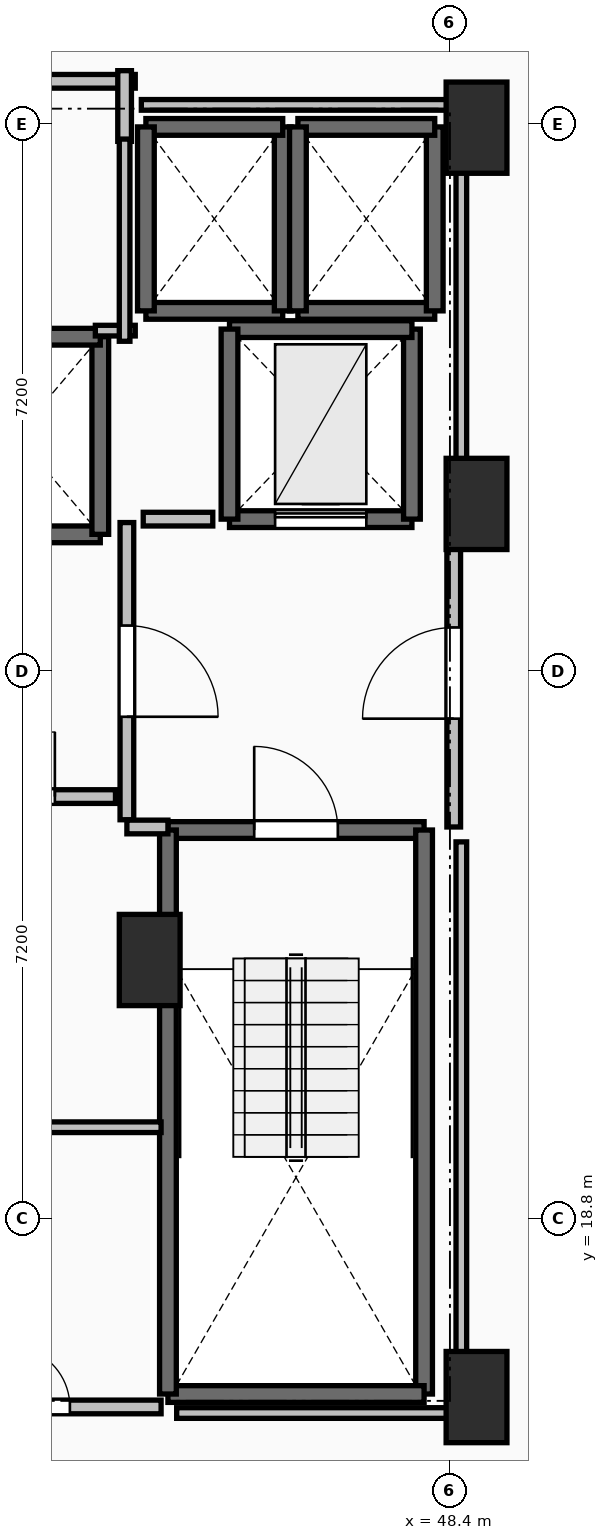
"""IFC4 building model, lengths in metres.
Left out: names, types, materials, properties, quantities, classifications, styles, units other than length and angle.
Written with IfcOpenShell. Run it as: python <this file> out.ifc"""

import sys

from ifc_helpers import new_model, si_unit, direction, frame, frame_2d, origin, origin_2d, place, context, subcontext, project, spatial, rectangle, extrude, element, fill, save


model = new_model("IFC4")
c1 = context("Model", 3, precision=1e-05, world=origin(), true_north=direction((0.0, 1.0)))
c2 = subcontext(c1, "Body", "Model", "MODEL_VIEW")
j1 = project(units=[si_unit("LENGTHUNIT", "METRE"), si_unit("PLANEANGLEUNIT", "RADIAN")], contexts=[c1])
p1 = place(None, origin())
s1 = spatial("IfcSite", under=j1, at=p1, CompositionType="ELEMENT")
p2 = place(p1, origin())
s2 = spatial("IfcBuilding", under=s1, at=p2, CompositionType="ELEMENT")
p3 = place(p2, frame((0.0, 0.0, 34.5)))
s3 = spatial("IfcBuildingStorey", under=s2, at=p3, CompositionType="ELEMENT", Elevation=34.5)
for number, where, z_axis, x_axis in (
    (1, (48.75, 33.15, 0.0), (0.0, 0.0, 1.0), (1.0, 0.0, 0.0)),
    (2, (48.75, 28.2, 0.0), (0.0, 0.0, 1.0), (1.0, 0.0, 0.0)),
    (3, (48.75, 16.45, 0.0), (0.0, 0.0, 1.0), (1.0, 0.0, 0.0)),
    (4, (44.45, 22.2, 0.0), (0.0, 0.0, 1.0), (1.0, 0.0, 0.0)),
):
    element("IfcColumn", number, at=place(p3, frame(where, z_axis=z_axis, x_axis=x_axis)), inside=s3, PredefinedType="PILASTER", context=c2, shape_type="SweptSolid", body=[
        extrude(rectangle(XDim=0.8, YDim=1.2, at=origin_2d()), origin(), (0.0, 0.0, 1.0), 3.5),
    ])
p4 = place(p3, frame((44.69, 23.91, 0.0), z_axis=(0.0, 0.0, 1.0), x_axis=(1.0, 0.0, 0.0)))
e5 = element("IfcWall", 5, at=p4, inside=s3, PredefinedType="SOLIDWALL", context=c2, shape_type="SweptSolid", body=[
    extrude(rectangle(XDim=3.37, YDim=0.22, at=frame_2d((1.685, 0.0))), origin(), (0.0, 0.0, 1.0), 3.24),
])
p5 = place(p4, frame((1.135, 0.0, 0.0)))
e6 = element("IfcOpeningElement", 6, at=p5, cuts=e5, PredefinedType="OPENING", context=c2, shape_type="SweptSolid", body=[
    extrude(rectangle(XDim=1.1, YDim=2.15, at=frame_2d((0.55, 1.075))), frame((0.0, 0.125, 0.0), z_axis=(0.0, -1.0, 0.0), x_axis=(1.0, 0.0, 0.0)), (0.0, 0.0, 1.0), 0.25),
])
p6 = place(p3, frame((48.06, 23.91, 0.0), z_axis=(0.0, 0.0, 1.0), x_axis=(0.0, -1.0, 0.0)))
e7 = element("IfcWall", 7, at=p6, inside=s3, PredefinedType="SOLIDWALL", context=c2, shape_type="SweptSolid", body=[
    extrude(rectangle(XDim=7.42, YDim=0.22, at=frame_2d((3.71, 0.0))), origin(), (0.0, 0.0, 1.0), 3.24),
])
p7 = place(p3, frame((48.06, 16.49, 0.0), z_axis=(0.0, 0.0, 1.0), x_axis=(-1.0, 0.0, 0.0)))
e8 = element("IfcWall", 8, at=p7, inside=s3, PredefinedType="SOLIDWALL", context=c2, shape_type="SweptSolid", body=[
    extrude(rectangle(XDim=3.37, YDim=0.22, at=frame_2d((1.685, 0.0))), origin(), (0.0, 0.0, 1.0), 3.24),
])
p8 = place(p3, frame((44.69, 16.49, 0.0), z_axis=(0.0, 0.0, 1.0), x_axis=(0.0, 1.0, 0.0)))
e9 = element("IfcWall", 9, at=p8, inside=s3, PredefinedType="SOLIDWALL", context=c2, shape_type="SweptSolid", body=[
    extrude(rectangle(XDim=7.42, YDim=0.22, at=frame_2d((3.71, 0.0))), origin(), (0.0, 0.0, 1.0), 3.24),
])
p9 = place(p3, frame((41.6, 27.8, 0.0), z_axis=(0.0, 0.0, 1.0), x_axis=(1.0, 0.0, 0.0)))
e10 = element("IfcWall", 10, at=p9, inside=s3, PredefinedType="SOLIDWALL", context=c2, shape_type="SweptSolid", body=[
    extrude(rectangle(XDim=2.2, YDim=0.22, at=frame_2d((1.1, 0.0))), origin(), (0.0, 0.0, 1.0), 3.24),
])
p10 = place(p3, frame((43.8, 27.8, 0.0), z_axis=(0.0, 0.0, 1.0), x_axis=(0.0, 1.0, 0.0)))
e11 = element("IfcWall", 11, at=p10, inside=s3, PredefinedType="SOLIDWALL", context=c2, shape_type="SweptSolid", body=[
    extrude(rectangle(XDim=2.6, YDim=0.22, at=frame_2d((1.3, 0.0))), origin(), (0.0, 0.0, 1.0), 3.24),
])
p11 = place(p3, frame((43.8, 30.4, 0.0), z_axis=(0.0, 0.0, 1.0), x_axis=(-1.0, 0.0, 0.0)))
e12 = element("IfcWall", 12, at=p11, inside=s3, PredefinedType="SOLIDWALL", context=c2, shape_type="SweptSolid", body=[
    extrude(rectangle(XDim=2.2, YDim=0.22, at=frame_2d((1.1, 0.0))), origin(), (0.0, 0.0, 1.0), 3.24),
])
p12 = place(p3, frame((44.4, 30.74, 0.0), z_axis=(0.0, 0.0, 1.0), x_axis=(1.0, 0.0, 0.0)))
e13 = element("IfcWall", 13, at=p12, inside=s3, PredefinedType="SOLIDWALL", context=c2, shape_type="SweptSolid", body=[
    extrude(rectangle(XDim=1.8, YDim=0.22, at=frame_2d((0.9, 0.0))), origin(), (0.0, 0.0, 1.0), 3.24),
])
p13 = place(p3, frame((46.2, 30.74, 0.0), z_axis=(0.0, 0.0, 1.0), x_axis=(0.0, 1.0, 0.0)))
e14 = element("IfcWall", 14, at=p13, inside=s3, PredefinedType="SOLIDWALL", context=c2, shape_type="SweptSolid", body=[
    extrude(rectangle(XDim=2.42, YDim=0.22, at=frame_2d((1.21, 0.0))), origin(), (0.0, 0.0, 1.0), 3.24),
])
p14 = place(p3, frame((46.2, 33.16, 0.0), z_axis=(0.0, 0.0, 1.0), x_axis=(-1.0, 0.0, 0.0)))
e15 = element("IfcWall", 15, at=p14, inside=s3, PredefinedType="SOLIDWALL", context=c2, shape_type="SweptSolid", body=[
    extrude(rectangle(XDim=1.8, YDim=0.22, at=frame_2d((0.9, 0.0))), origin(), (0.0, 0.0, 1.0), 3.24),
])
p15 = place(p3, frame((44.4, 33.16, 0.0), z_axis=(0.0, 0.0, 1.0), x_axis=(0.0, -1.0, 0.0)))
e16 = element("IfcWall", 16, at=p15, inside=s3, PredefinedType="SOLIDWALL", context=c2, shape_type="SweptSolid", body=[
    extrude(rectangle(XDim=2.42, YDim=0.22, at=frame_2d((1.21, 0.0))), origin(), (0.0, 0.0, 1.0), 3.24),
])
p16 = place(p3, frame((46.4, 30.74, 0.0), z_axis=(0.0, 0.0, 1.0), x_axis=(1.0, 0.0, 0.0)))
e17 = element("IfcWall", 17, at=p16, inside=s3, PredefinedType="SOLIDWALL", context=c2, shape_type="SweptSolid", body=[
    extrude(rectangle(XDim=1.8, YDim=0.22, at=frame_2d((0.9, 0.0))), origin(), (0.0, 0.0, 1.0), 3.24),
])
p17 = place(p3, frame((48.2, 30.74, 0.0), z_axis=(0.0, 0.0, 1.0), x_axis=(0.0, 1.0, 0.0)))
e18 = element("IfcWall", 18, at=p17, inside=s3, PredefinedType="SOLIDWALL", context=c2, shape_type="SweptSolid", body=[
    extrude(rectangle(XDim=2.42, YDim=0.22, at=frame_2d((1.21, 0.0))), origin(), (0.0, 0.0, 1.0), 3.24),
])
p18 = place(p3, frame((48.2, 33.16, 0.0), z_axis=(0.0, 0.0, 1.0), x_axis=(-1.0, 0.0, 0.0)))
e19 = element("IfcWall", 19, at=p18, inside=s3, PredefinedType="SOLIDWALL", context=c2, shape_type="SweptSolid", body=[
    extrude(rectangle(XDim=1.8, YDim=0.22, at=frame_2d((0.9, 0.0))), origin(), (0.0, 0.0, 1.0), 3.24),
])
p19 = place(p3, frame((46.4, 33.16, 0.0), z_axis=(0.0, 0.0, 1.0), x_axis=(0.0, -1.0, 0.0)))
e20 = element("IfcWall", 20, at=p19, inside=s3, PredefinedType="SOLIDWALL", context=c2, shape_type="SweptSolid", body=[
    extrude(rectangle(XDim=2.42, YDim=0.22, at=frame_2d((1.21, 0.0))), origin(), (0.0, 0.0, 1.0), 3.24),
])
p20 = place(p3, frame((45.5, 28.0, 0.0), z_axis=(0.0, 0.0, 1.0), x_axis=(1.0, 0.0, 0.0)))
e21 = element("IfcWall", 21, at=p20, inside=s3, PredefinedType="SHEAR", context=c2, shape_type="SweptSolid", body=[
    extrude(rectangle(XDim=2.4, YDim=0.22, at=frame_2d((1.2, 0.0))), origin(), (0.0, 0.0, 1.0), 3.24),
])
p21 = place(p20, frame((0.6, 0.0, 0.0)))
e22 = element("IfcOpeningElement", 22, at=p21, cuts=e21, PredefinedType="OPENING", context=c2, shape_type="SweptSolid", body=[
    extrude(rectangle(XDim=1.2, YDim=2.2, at=frame_2d((0.6, 1.1))), frame((0.0, 0.125, 0.0), z_axis=(0.0, -1.0, 0.0), x_axis=(1.0, 0.0, 0.0)), (0.0, 0.0, 1.0), 0.25),
])
p22 = place(p3, frame((47.9, 28.0, 0.0), z_axis=(0.0, 0.0, 1.0), x_axis=(0.0, 1.0, 0.0)))
e23 = element("IfcWall", 23, at=p22, inside=s3, PredefinedType="SHEAR", context=c2, shape_type="SweptSolid", body=[
    extrude(rectangle(XDim=2.5, YDim=0.22, at=frame_2d((1.25, 0.0))), origin(), (0.0, 0.0, 1.0), 3.24),
])
p23 = place(p3, frame((47.9, 30.5, 0.0), z_axis=(0.0, 0.0, 1.0), x_axis=(-1.0, 0.0, 0.0)))
e24 = element("IfcWall", 24, at=p23, inside=s3, PredefinedType="SHEAR", context=c2, shape_type="SweptSolid", body=[
    extrude(rectangle(XDim=2.4, YDim=0.22, at=frame_2d((1.2, 0.0))), origin(), (0.0, 0.0, 1.0), 3.24),
])
p24 = place(p3, frame((45.5, 30.5, 0.0), z_axis=(0.0, 0.0, 1.0), x_axis=(0.0, -1.0, 0.0)))
e25 = element("IfcWall", 25, at=p24, inside=s3, PredefinedType="SHEAR", context=c2, shape_type="SweptSolid", body=[
    extrude(rectangle(XDim=2.5, YDim=0.22, at=frame_2d((1.25, 0.0))), origin(), (0.0, 0.0, 1.0), 3.24),
])
p25 = place(p3, frame((44.15, 27.955, 0.0), z_axis=(0.0, 0.0, 1.0), x_axis=(0.0, -1.0, 0.0)))
e26 = element("IfcWall", 26, at=p25, inside=s3, PredefinedType="PARTITIONING", context=c2, shape_type="SweptSolid", body=[
    extrude(rectangle(XDim=3.91, YDim=0.18, at=frame_2d((1.955, 0.0))), origin(), (0.0, 0.0, 1.0), 3.24),
])
p26 = place(p25, frame((1.355, 0.0, 0.0)))
e27 = element("IfcOpeningElement", 27, at=p26, cuts=e26, PredefinedType="OPENING", context=c2, shape_type="SweptSolid", body=[
    extrude(rectangle(XDim=1.2, YDim=2.15, at=frame_2d((0.6, 1.075))), frame((0.0, 0.105, 0.0), z_axis=(0.0, -1.0, 0.0), x_axis=(1.0, 0.0, 0.0)), (0.0, 0.0, 1.0), 0.21),
])
p27 = place(p3, frame((44.15, 23.95, 0.0), z_axis=(0.0, 0.0, 1.0), x_axis=(1.0, 0.0, 0.0)))
e28 = element("IfcWall", 28, at=p27, inside=s3, PredefinedType="PARTITIONING", context=c2, shape_type="SweptSolid", body=[
    extrude(rectangle(XDim=0.54, YDim=0.18, at=frame_2d((0.27, 0.0))), origin(), (0.0, 0.0, 1.0), 3.24),
])
p28 = place(p3, frame((48.45, 23.95, 0.0), z_axis=(0.0, 0.0, 1.0), x_axis=(0.0, 1.0, 0.0)))
e29 = element("IfcWall", 29, at=p28, inside=s3, PredefinedType="PARTITIONING", context=c2, shape_type="SweptSolid", body=[
    extrude(rectangle(XDim=4.05, YDim=0.18, at=frame_2d((2.025, 0.0))), origin(), (0.0, 0.0, 1.0), 3.24),
])
p29 = place(p28, frame((1.425, 0.0, 0.0)))
e30 = element("IfcOpeningElement", 30, at=p29, cuts=e29, PredefinedType="OPENING", context=c2, shape_type="SweptSolid", body=[
    extrude(rectangle(XDim=1.2, YDim=2.15, at=frame_2d((0.6, 1.075))), frame((0.0, 0.105, 0.0), z_axis=(0.0, -1.0, 0.0), x_axis=(1.0, 0.0, 0.0)), (0.0, 0.0, 1.0), 0.21),
])
p30 = place(p3, frame((41.555, 24.35, 0.0), z_axis=(0.0, 0.0, 1.0), x_axis=(1.0, 0.0, 0.0)))
e31 = element("IfcWall", 31, at=p30, inside=s3, PredefinedType="PARTITIONING", context=c2, shape_type="SweptSolid", body=[
    extrude(rectangle(XDim=2.445, YDim=0.18, at=frame_2d((1.223, 0.0))), origin(), (0.0, 0.0, 1.0), 3.24),
])
p31 = place(p30, frame((0.798, 0.0, 0.0)))
e32 = element("IfcOpeningElement", 32, at=p31, cuts=e31, PredefinedType="OPENING", context=c2, shape_type="SweptSolid", body=[
    extrude(rectangle(XDim=0.85, YDim=2.1, at=frame_2d((0.425, 1.05))), frame((0.0, 0.105, 0.0), z_axis=(0.0, -1.0, 0.0), x_axis=(1.0, 0.0, 0.0)), (0.0, 0.0, 1.0), 0.21),
])
p32 = place(p3, frame((44.6, 20.0, 0.0), z_axis=(0.0, 0.0, 1.0), x_axis=(-1.0, 0.0, 0.0)))
e33 = element("IfcWall", 33, at=p32, inside=s3, PredefinedType="PARTITIONING", context=c2, shape_type="SweptSolid", body=[
    extrude(rectangle(XDim=3.2, YDim=0.14, at=frame_2d((1.6, 0.0))), origin(), (0.0, 0.0, 1.0), 3.24),
])
p33 = place(p3, frame((41.4, 16.32, 0.0), z_axis=(0.0, 0.0, 1.0), x_axis=(1.0, 0.0, 0.0)))
e34 = element("IfcWall", 34, at=p33, inside=s3, PredefinedType="PARTITIONING", context=c2, shape_type="SweptSolid", body=[
    extrude(rectangle(XDim=3.2, YDim=0.18, at=frame_2d((1.6, 0.0))), origin(), (0.0, 0.0, 1.0), 3.24),
])
p34 = place(p33, frame((1.2, 0.0, 0.0)))
e35 = element("IfcOpeningElement", 35, at=p34, cuts=e34, PredefinedType="OPENING", context=c2, shape_type="SweptSolid", body=[
    extrude(rectangle(XDim=0.8, YDim=2.05, at=frame_2d((0.4, 1.025))), frame((0.0, 0.105, 0.0), z_axis=(0.0, -1.0, 0.0), x_axis=(1.0, 0.0, 0.0)), (0.0, 0.0, 1.0), 0.21),
])
p35 = place(p3, frame((44.26, 33.76, 0.0), z_axis=(0.0, 0.0, 1.0), x_axis=(-1.0, 0.0, 0.0)))
e36 = element("IfcWall", 36, at=p35, inside=s3, PredefinedType="PARTITIONING", context=c2, shape_type="SweptSolid", body=[
    extrude(rectangle(XDim=6.91, YDim=0.18, at=frame_2d((3.455, 0.0))), origin(), (0.0, 0.0, 1.0), 3.24),
])
p36 = place(p35, frame((3.03, 0.0, 0.0)))
e37 = element("IfcOpeningElement", 37, at=p36, cuts=e36, PredefinedType="OPENING", context=c2, shape_type="SweptSolid", body=[
    extrude(rectangle(XDim=0.85, YDim=2.1, at=frame_2d((0.425, 1.05))), frame((0.0, 0.105, 0.0), z_axis=(0.0, -1.0, 0.0), x_axis=(1.0, 0.0, 0.0)), (0.0, 0.0, 1.0), 0.21),
])
p37 = place(p3, frame((44.12, 32.97, 0.0), z_axis=(0.0, 0.0, 1.0), x_axis=(0.0, 1.0, 0.0)))
e38 = element("IfcWall", 38, at=p37, inside=s3, PredefinedType="PARTITIONING", context=c2, shape_type="SweptSolid", body=[
    extrude(rectangle(XDim=0.93, YDim=0.18, at=frame_2d((0.465, 0.0))), origin(), (0.0, 0.0, 1.0), 3.24),
])
p38 = place(p3, frame((45.28, 28.0, 0.0), z_axis=(0.0, 0.0, 1.0), x_axis=(-1.0, 0.0, 0.0)))
e39 = element("IfcWall", 39, at=p38, inside=s3, PredefinedType="PARTITIONING", context=c2, shape_type="SweptSolid", body=[
    extrude(rectangle(XDim=0.915, YDim=0.18, at=frame_2d((0.458, 0.0))), origin(), (0.0, 0.0, 1.0), 3.24),
])
p39 = place(p3, frame((43.735, 30.48, 0.0), z_axis=(0.0, 0.0, 1.0), x_axis=(1.0, 0.0, 0.0)))
e40 = element("IfcWall", 40, at=p39, inside=s3, PredefinedType="PARTITIONING", context=c2, shape_type="SweptSolid", body=[
    extrude(rectangle(XDim=0.525, YDim=0.14, at=frame_2d((0.262, 0.0))), origin(), (0.0, 0.0, 1.0), 3.24),
])
p40 = place(p3, frame((44.12, 30.34, 0.0), z_axis=(0.0, 0.0, 1.0), x_axis=(0.0, 1.0, 0.0)))
e41 = element("IfcWall", 41, at=p40, inside=s3, PredefinedType="PARTITIONING", context=c2, shape_type="SweptSolid", body=[
    extrude(rectangle(XDim=2.66, YDim=0.14, at=frame_2d((1.33, 0.0))), origin(), (0.0, 0.0, 1.0), 3.24),
])
p41 = place(p3, frame((44.34, 33.45, 0.0), z_axis=(0.0, 0.0, 1.0), x_axis=(1.0, 0.0, 0.0)))
e42 = element("IfcWall", 42, at=p41, inside=s3, PredefinedType="PARTITIONING", context=c2, shape_type="SweptSolid", body=[
    extrude(rectangle(XDim=4.21, YDim=0.14, at=frame_2d((2.105, 0.0))), origin(), (0.0, 0.0, 1.0), 2.432),
])
p42 = place(p3, frame((48.55, 33.45, 0.0), z_axis=(0.0, 0.0, 1.0), x_axis=(0.0, -1.0, 0.0)))
e43 = element("IfcWall", 43, at=p42, inside=s3, PredefinedType="PARTITIONING", context=c2, shape_type="SweptSolid", body=[
    extrude(rectangle(XDim=5.254, YDim=0.14, at=frame_2d((2.627, 0.0))), origin(), (0.0, 0.0, 1.0), 2.432),
])
p43 = place(p3, frame((48.55, 23.754, 0.0), z_axis=(0.0, 0.0, 1.0), x_axis=(0.0, -1.0, 0.0)))
e44 = element("IfcWall", 44, at=p43, inside=s3, PredefinedType="PARTITIONING", context=c2, shape_type="SweptSolid", body=[
    extrude(rectangle(XDim=7.514, YDim=0.14, at=frame_2d((3.757, 0.0))), origin(), (0.0, 0.0, 1.0), 2.432),
])
p44 = place(p3, frame((48.55, 16.24, 0.0), z_axis=(0.0, 0.0, 1.0), x_axis=(-1.0, 0.0, 0.0)))
e45 = element("IfcWall", 45, at=p44, inside=s3, PredefinedType="PARTITIONING", context=c2, shape_type="SweptSolid", body=[
    extrude(rectangle(XDim=3.745, YDim=0.14, at=frame_2d((1.873, 0.0))), origin(), (0.0, 0.0, 1.0), 2.432),
])
p45 = place(p5, origin())
e46 = element("IfcDoor", 46, at=p45, inside=s3, OperationType="SINGLE_SWING_LEFT", PredefinedType="DOOR", context=c2, shape_type="SweptSolid", body=[
    extrude(rectangle(XDim=1.1, YDim=2.15, at=frame_2d((0.55, 1.075))), frame((0.0, 0.025, 0.0), z_axis=(0.0, -1.0, 0.0), x_axis=(1.0, 0.0, 0.0)), (0.0, 0.0, 1.0), 0.05),
])
fill(e6, e46)
p46 = place(p21, origin())
e47 = element("IfcDoor", 47, at=p46, inside=s3, OperationType="SLIDING_TO_LEFT", PredefinedType="DOOR", context=c2, shape_type="SweptSolid", body=[
    extrude(rectangle(XDim=1.2, YDim=2.2, at=frame_2d((0.6, 1.1))), frame((0.0, 0.025, 0.0), z_axis=(0.0, -1.0, 0.0), x_axis=(1.0, 0.0, 0.0)), (0.0, 0.0, 1.0), 0.05),
])
fill(e22, e47)
p47 = place(p26, origin())
e48 = element("IfcDoor", 48, at=p47, inside=s3, OperationType="SINGLE_SWING_RIGHT", PredefinedType="DOOR", context=c2, shape_type="SweptSolid", body=[
    extrude(rectangle(XDim=1.2, YDim=2.15, at=frame_2d((0.6, 1.075))), frame((0.0, 0.025, 0.0), z_axis=(0.0, -1.0, 0.0), x_axis=(1.0, 0.0, 0.0)), (0.0, 0.0, 1.0), 0.05),
])
fill(e27, e48)
p48 = place(p29, origin())
e49 = element("IfcDoor", 49, at=p48, inside=s3, OperationType="SINGLE_SWING_LEFT", PredefinedType="DOOR", context=c2, shape_type="SweptSolid", body=[
    extrude(rectangle(XDim=1.2, YDim=2.15, at=frame_2d((0.6, 1.075))), frame((0.0, 0.025, 0.0), z_axis=(0.0, -1.0, 0.0), x_axis=(1.0, 0.0, 0.0)), (0.0, 0.0, 1.0), 0.05),
])
fill(e30, e49)
p49 = place(p31, origin())
e50 = element("IfcDoor", 50, at=p49, inside=s3, OperationType="SINGLE_SWING_RIGHT", PredefinedType="DOOR", context=c2, shape_type="SweptSolid", body=[
    extrude(rectangle(XDim=0.85, YDim=2.1, at=frame_2d((0.425, 1.05))), frame((0.0, 0.025, 0.0), z_axis=(0.0, -1.0, 0.0), x_axis=(1.0, 0.0, 0.0)), (0.0, 0.0, 1.0), 0.05),
])
fill(e32, e50)
p50 = place(p34, origin())
e51 = element("IfcDoor", 51, at=p50, inside=s3, OperationType="SINGLE_SWING_LEFT", PredefinedType="DOOR", context=c2, shape_type="SweptSolid", body=[
    extrude(rectangle(XDim=0.8, YDim=2.05, at=frame_2d((0.4, 1.025))), frame((0.0, 0.025, 0.0), z_axis=(0.0, -1.0, 0.0), x_axis=(1.0, 0.0, 0.0)), (0.0, 0.0, 1.0), 0.05),
])
fill(e35, e51)
save(model, sys.argv[1])
